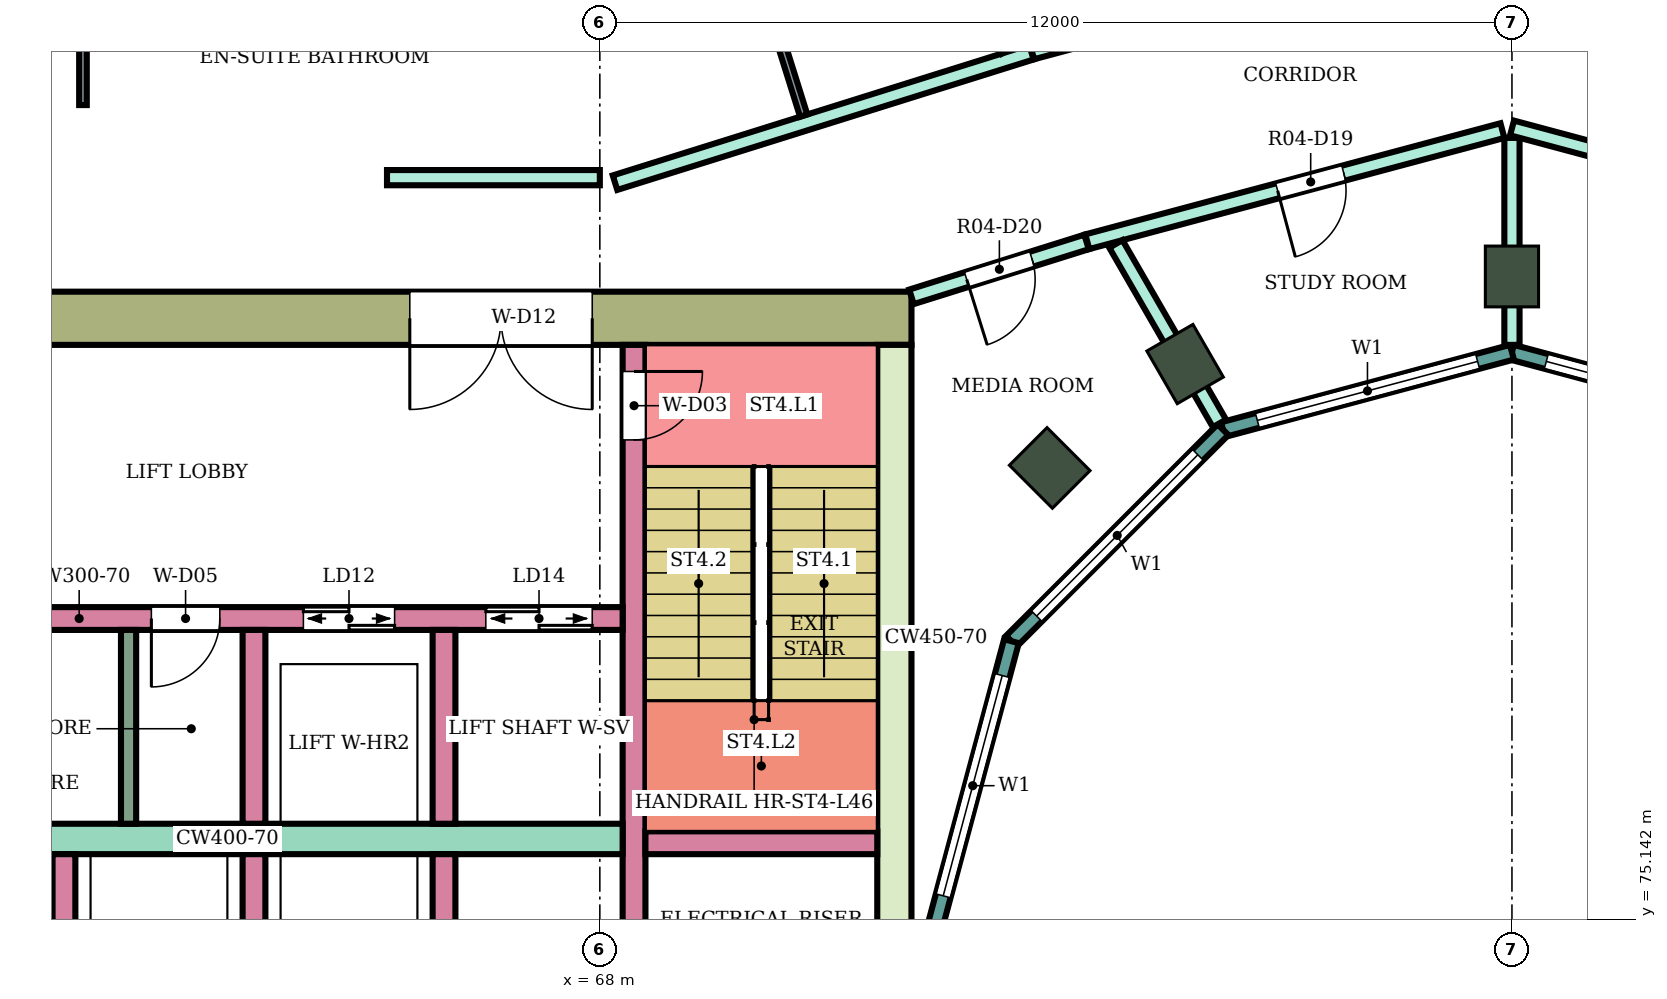
"""IFC4 building model, lengths in metres.
Left out: names, types, materials, properties, quantities, classifications, styles, units other than length and angle.
Written with IfcOpenShell. Run it as: python <this file> out.ifc"""

import sys

from ifc_helpers import new_model, si_unit, direction, frame, frame_2d, origin, origin_2d, place, context, subcontext, project, spatial, rectangle, extrude, element, fill, save


model = new_model("IFC4")
c1 = context("Model", 3, precision=1e-05, world=origin(), true_north=direction((0.0, 1.0)))
c2 = subcontext(c1, "Body", "Model", "MODEL_VIEW")
j1 = project(units=[si_unit("LENGTHUNIT", "METRE"), si_unit("PLANEANGLEUNIT", "RADIAN")], contexts=[c1])
p1 = place(None, origin())
s1 = spatial("IfcSite", under=j1, at=p1, CompositionType="ELEMENT")
p2 = place(p1, origin())
s2 = spatial("IfcBuilding", under=s1, at=p2, CompositionType="ELEMENT")
p3 = place(p2, frame((0.0, 0.0, 198.7)))
s3 = spatial("IfcBuildingStorey", under=s2, at=p3, CompositionType="ELEMENT", Elevation=198.7)
for number, where, z_axis, x_axis in (
    (1, (80.0, 83.6, 0.0), (0.0, 0.0, 1.0), (0.0, 1.0, 0.0)),
    (2, (75.7, 82.448, 0.0), (0.0, 0.0, 1.0), (-0.5, 0.866, 0.0)),
    (3, (73.919, 81.081, 0.0), (0.0, 0.0, 1.0), (-0.707, 0.707, 0.0)),
):
    element("IfcColumn", number, at=place(p3, frame(where, z_axis=z_axis, x_axis=x_axis)), inside=s3, PredefinedType="COLUMN", context=c2, shape_type="SweptSolid", body=[
        extrude(rectangle(XDim=0.8, YDim=0.7, at=origin_2d()), origin(), (0.0, 0.0, 1.0), 4.1),
    ])
p4 = place(p3, frame((72.1, 83.05, 0.0), z_axis=(0.0, 0.0, 1.0), x_axis=(-1.0, 0.0, 0.0)))
e4 = element("IfcWall", 4, at=p4, inside=s3, PredefinedType="SHEAR", context=c2, shape_type="SweptSolid", body=[
    extrude(rectangle(XDim=14.8, YDim=0.7, at=frame_2d((7.4, 0.0))), origin(), (0.0, 0.0, 1.0), 3.78),
])
p5 = place(p4, frame((4.2, 0.0, 0.0)))
e5 = element("IfcOpeningElement", 5, at=p5, cuts=e4, PredefinedType="OPENING", context=c2, shape_type="SweptSolid", body=[
    extrude(rectangle(XDim=2.4, YDim=2.4, at=frame_2d((1.2, 1.2))), frame((0.0, 0.36, 0.0), z_axis=(0.0, -1.0, 0.0), x_axis=(1.0, 0.0, 0.0)), (0.0, 0.0, 1.0), 0.72),
])
p6 = place(p3, frame((71.875, 82.7, 0.0), z_axis=(0.0, 0.0, 1.0), x_axis=(0.0, -1.0, 0.0)))
e6 = element("IfcWall", 6, at=p6, inside=s3, PredefinedType="SHEAR", context=c2, shape_type="SweptSolid", body=[
    extrude(rectangle(XDim=7.7, YDim=0.45, at=frame_2d((3.85, 0.0))), origin(), (0.0, 0.0, 1.0), 3.78),
])
p7 = place(p3, frame((68.45, 82.7, 0.0), z_axis=(0.0, 0.0, 1.0), x_axis=(0.0, -1.0, 0.0)))
e7 = element("IfcWall", 7, at=p7, inside=s3, PredefinedType="SHEAR", context=c2, shape_type="SweptSolid", body=[
    extrude(rectangle(XDim=7.7, YDim=0.3, at=frame_2d((3.85, 0.0))), origin(), (0.0, 0.0, 1.0), 3.78),
])
p8 = place(p7, frame((0.35, 0.0, 0.0)))
e8 = element("IfcOpeningElement", 8, at=p8, cuts=e7, PredefinedType="OPENING", context=c2, shape_type="SweptSolid", body=[
    extrude(rectangle(XDim=0.9, YDim=2.1, at=frame_2d((0.45, 1.05))), frame((0.0, 0.16, 0.0), z_axis=(0.0, -1.0, 0.0), x_axis=(1.0, 0.0, 0.0)), (0.0, 0.0, 1.0), 0.32),
])
p9 = place(p3, frame((71.65, 76.15, 0.0), z_axis=(0.0, 0.0, 1.0), x_axis=(-1.0, 0.0, 0.0)))
e9 = element("IfcWall", 9, at=p9, inside=s3, PredefinedType="SHEAR", context=c2, shape_type="SweptSolid", body=[
    extrude(rectangle(XDim=3.05, YDim=0.3, at=frame_2d((1.525, 0.0))), origin(), (0.0, 0.0, 1.0), 3.78),
])
p10 = place(p3, frame((68.3, 76.2, 0.0), z_axis=(0.0, 0.0, 1.0), x_axis=(-1.0, 0.0, 0.0)))
e10 = element("IfcWall", 10, at=p10, inside=s3, PredefinedType="SHEAR", context=c2, shape_type="SweptSolid", body=[
    extrude(rectangle(XDim=11.0, YDim=0.4, at=frame_2d((5.5, 0.0))), origin(), (0.0, 0.0, 1.0), 3.78),
])
p11 = place(p3, frame((68.3, 79.1, 0.0), z_axis=(0.0, 0.0, 1.0), x_axis=(-1.0, 0.0, 0.0)))
e11 = element("IfcWall", 11, at=p11, inside=s3, PredefinedType="SHEAR", context=c2, shape_type="SweptSolid", body=[
    extrude(rectangle(XDim=11.0, YDim=0.3, at=frame_2d((5.5, 0.0))), origin(), (0.0, 0.0, 1.0), 3.78),
])
p12 = place(p11, frame((0.4, 0.0, 0.0)))
e12 = element("IfcOpeningElement", 12, at=p12, cuts=e11, PredefinedType="OPENING", context=c2, shape_type="SweptSolid", body=[
    extrude(rectangle(XDim=1.4, YDim=2.1, at=frame_2d((0.7, 1.05))), frame((0.0, 0.16, 0.0), z_axis=(0.0, -1.0, 0.0), x_axis=(1.0, 0.0, 0.0)), (0.0, 0.0, 1.0), 0.32),
])
p13 = place(p11, frame((3.0, 0.0, 0.0)))
e13 = element("IfcOpeningElement", 13, at=p13, cuts=e11, PredefinedType="OPENING", context=c2, shape_type="SweptSolid", body=[
    extrude(rectangle(XDim=1.2, YDim=2.1, at=frame_2d((0.6, 1.05))), frame((0.0, 0.16, 0.0), z_axis=(0.0, -1.0, 0.0), x_axis=(1.0, 0.0, 0.0)), (0.0, 0.0, 1.0), 0.32),
])
p14 = place(p11, frame((5.3, 0.0, 0.0)))
e14 = element("IfcOpeningElement", 14, at=p14, cuts=e11, PredefinedType="OPENING", context=c2, shape_type="SweptSolid", body=[
    extrude(rectangle(XDim=0.9, YDim=2.1, at=frame_2d((0.45, 1.05))), frame((0.0, 0.16, 0.0), z_axis=(0.0, -1.0, 0.0), x_axis=(1.0, 0.0, 0.0)), (0.0, 0.0, 1.0), 0.32),
])
p15 = place(p11, frame((8.3, 0.0, 0.0)))
e15 = element("IfcOpeningElement", 15, at=p15, cuts=e11, PredefinedType="OPENING", context=c2, shape_type="SweptSolid", body=[
    extrude(rectangle(XDim=0.9, YDim=2.1, at=frame_2d((0.45, 1.05))), frame((0.0, 0.16, 0.0), z_axis=(0.0, -1.0, 0.0), x_axis=(1.0, 0.0, 0.0)), (0.0, 0.0, 1.0), 0.32),
])
for number, where, z_axis, x_axis in (
    (16, (65.95, 76.0, 0.0), (0.0, 0.0, 1.0), (0.0, -1.0, 0.0)),
    (17, (63.45, 76.0, 0.0), (0.0, 0.0, 1.0), (0.0, -1.0, 0.0)),
    (18, (60.95, 76.0, 0.0), (0.0, 0.0, 1.0), (0.0, -1.0, 0.0)),
    (19, (65.95, 78.95, 0.0), (0.0, 0.0, 1.0), (0.0, -1.0, 0.0)),
    (20, (63.45, 78.95, 0.0), (0.0, 0.0, 1.0), (0.0, -1.0, 0.0)),
):
    element("IfcWall", number, at=place(p3, frame(where, z_axis=z_axis, x_axis=x_axis)), inside=s3, PredefinedType="SHEAR", context=c2, shape_type="SweptSolid", body=[
        extrude(rectangle(XDim=2.55, YDim=0.3, at=frame_2d((1.275, 0.0))), origin(), (0.0, 0.0, 1.0), 3.78),
    ])
p16 = place(p3, frame((83.802, 81.585, 0.0), z_axis=(0.0, 0.0, 1.0), x_axis=(-0.965933654434, 0.258789828301, 0.0)))
e21 = element("IfcWall", 21, at=p16, inside=s3, PredefinedType="NOTDEFINED", context=c2, shape_type="SweptSolid", body=[
    extrude(rectangle(XDim=3.936, YDim=0.2, at=frame_2d((1.968, 0.0))), origin(), (0.0, 0.0, 1.0), 4.1),
])
p17 = place(p16, frame((0.468, 0.0, 0.9)))
e22 = element("IfcOpeningElement", 22, at=p17, cuts=e21, PredefinedType="OPENING", context=c2, shape_type="SweptSolid", body=[
    extrude(rectangle(XDim=3.0, YDim=2.3, at=frame_2d((1.5, 1.15))), frame((0.0, 0.11, 0.0), z_axis=(0.0, -1.0, 0.0), x_axis=(1.0, 0.0, 0.0)), (0.0, 0.0, 1.0), 0.22),
])
p18 = place(p3, frame((80.0, 82.604, 0.0), z_axis=(0.0, 0.0, 1.0), x_axis=(-0.965933654434, -0.258789828301, 0.0)))
e23 = element("IfcWall", 23, at=p18, inside=s3, PredefinedType="NOTDEFINED", context=c2, shape_type="SweptSolid", body=[
    extrude(rectangle(XDim=3.936, YDim=0.2, at=frame_2d((1.968, 0.0))), origin(), (0.0, 0.0, 1.0), 4.1),
])
p19 = place(p18, frame((0.468, 0.0, 0.9)))
e24 = element("IfcOpeningElement", 24, at=p19, cuts=e23, PredefinedType="OPENING", context=c2, shape_type="SweptSolid", body=[
    extrude(rectangle(XDim=3.0, YDim=2.3, at=frame_2d((1.5, 1.15))), frame((0.0, 0.11, 0.0), z_axis=(0.0, -1.0, 0.0), x_axis=(1.0, 0.0, 0.0)), (0.0, 0.0, 1.0), 0.22),
])
p20 = place(p3, frame((76.198, 81.585, 0.0), z_axis=(0.0, 0.0, 1.0), x_axis=(-0.707106781187, -0.707106781187, 0.0)))
e25 = element("IfcWall", 25, at=p20, inside=s3, PredefinedType="NOTDEFINED", context=c2, shape_type="SweptSolid", body=[
    extrude(rectangle(XDim=3.936, YDim=0.2, at=frame_2d((1.968, 0.0))), origin(), (0.0, 0.0, 1.0), 4.1),
])
p21 = place(p20, frame((0.468, 0.0, 0.9)))
e26 = element("IfcOpeningElement", 26, at=p21, cuts=e25, PredefinedType="OPENING", context=c2, shape_type="SweptSolid", body=[
    extrude(rectangle(XDim=3.0, YDim=2.3, at=frame_2d((1.5, 1.15))), frame((0.0, 0.11, 0.0), z_axis=(0.0, -1.0, 0.0), x_axis=(1.0, 0.0, 0.0)), (0.0, 0.0, 1.0), 0.22),
])
p22 = place(p3, frame((73.415, 78.802, 0.0), z_axis=(0.0, 0.0, 1.0), x_axis=(-0.258789828301, -0.965933654434, 0.0)))
e27 = element("IfcWall", 27, at=p22, inside=s3, PredefinedType="NOTDEFINED", context=c2, shape_type="SweptSolid", body=[
    extrude(rectangle(XDim=3.936, YDim=0.2, at=frame_2d((1.968, 0.0))), origin(), (0.0, 0.0, 1.0), 4.1),
])
p23 = place(p22, frame((0.468, 0.0, 0.9)))
e28 = element("IfcOpeningElement", 28, at=p23, cuts=e27, PredefinedType="OPENING", context=c2, shape_type="SweptSolid", body=[
    extrude(rectangle(XDim=3.0, YDim=2.3, at=frame_2d((1.5, 1.15))), frame((0.0, 0.11, 0.0), z_axis=(0.0, -1.0, 0.0), x_axis=(1.0, 0.0, 0.0)), (0.0, 0.0, 1.0), 0.22),
])
p24 = place(p3, frame((65.2, 84.9, 0.0), z_axis=(0.0, 0.0, 1.0), x_axis=(1.0, 0.0, 0.0)))
e29 = element("IfcWall", 29, at=p24, inside=s3, PredefinedType="PARTITIONING", context=c2, shape_type="SweptSolid", body=[
    extrude(rectangle(XDim=2.8, YDim=0.2, at=frame_2d((1.4, 0.0))), origin(), (0.0, 0.0, 1.0), 3.65),
])
p25 = place(p3, frame((68.2, 84.834, 0.0), z_axis=(0.0, 0.0, 1.0), x_axis=(0.954272398161, 0.298938438661, 0.0)))
e30 = element("IfcWall", 30, at=p25, inside=s3, PredefinedType="PARTITIONING", context=c2, shape_type="SweptSolid", body=[
    extrude(rectangle(XDim=5.74, YDim=0.2, at=frame_2d((2.87, 0.0))), origin(), (0.0, 0.0, 1.0), 3.65),
])
p26 = place(p3, frame((72.1, 83.332, 0.0), z_axis=(0.0, 0.0, 1.0), x_axis=(0.954233106619, 0.299063836383, 0.0)))
e31 = element("IfcWall", 31, at=p26, inside=s3, PredefinedType="PARTITIONING", context=c2, shape_type="SweptSolid", body=[
    extrude(rectangle(XDim=2.414, YDim=0.2, at=frame_2d((1.207, 0.0))), origin(), (0.0, 0.0, 1.0), 3.65),
])
p27 = place(p26, frame((0.762, 0.0, 0.0)))
e32 = element("IfcOpeningElement", 32, at=p27, cuts=e31, PredefinedType="OPENING", context=c2, shape_type="SweptSolid", body=[
    extrude(rectangle(XDim=0.9, YDim=2.1, at=frame_2d((0.45, 1.05))), frame((0.0, 0.11, 0.0), z_axis=(0.0, -1.0, 0.0), x_axis=(1.0, 0.0, 0.0)), (0.0, 0.0, 1.0), 0.22),
])
p28 = place(p3, frame((73.687, 86.554, 0.0), z_axis=(0.0, 0.0, 1.0), x_axis=(0.96595258731, 0.258719150952, 0.0)))
e33 = element("IfcWall", 33, at=p28, inside=s3, PredefinedType="PARTITIONING", context=c2, shape_type="SweptSolid", body=[
    extrude(rectangle(XDim=6.486, YDim=0.2, at=frame_2d((3.243, 0.0))), origin(), (0.0, 0.0, 1.0), 3.65),
])
p29 = place(p28, frame((0.55, 0.0, 0.0)))
e34 = element("IfcOpeningElement", 34, at=p29, cuts=e33, PredefinedType="OPENING", context=c2, shape_type="SweptSolid", body=[
    extrude(rectangle(XDim=1.0, YDim=2.1, at=frame_2d((0.5, 1.05))), frame((0.0, 0.11, 0.0), z_axis=(0.0, -1.0, 0.0), x_axis=(1.0, 0.0, 0.0)), (0.0, 0.0, 1.0), 0.22),
])
p30 = place(p3, frame((74.413, 84.057, 0.0), z_axis=(0.0, 0.0, 1.0), x_axis=(0.965972135939, 0.258646153246, 0.0)))
e35 = element("IfcWall", 35, at=p30, inside=s3, PredefinedType="PARTITIONING", context=c2, shape_type="SweptSolid", body=[
    extrude(rectangle(XDim=5.654, YDim=0.2, at=frame_2d((2.827, 0.0))), origin(), (0.0, 0.0, 1.0), 3.65),
])
p31 = place(p30, frame((2.593, 0.0, 0.0)))
e36 = element("IfcOpeningElement", 36, at=p31, cuts=e35, PredefinedType="OPENING", context=c2, shape_type="SweptSolid", body=[
    extrude(rectangle(XDim=0.9, YDim=2.1, at=frame_2d((0.45, 1.05))), frame((0.0, 0.11, 0.0), z_axis=(0.0, -1.0, 0.0), x_axis=(1.0, 0.0, 0.0)), (0.0, 0.0, 1.0), 0.22),
])
p32 = place(p3, frame((74.789, 84.028, 0.0), z_axis=(0.0, 0.0, 1.0), x_axis=(0.49993436518, -0.866063294749, 0.0)))
e37 = element("IfcWall", 37, at=p32, inside=s3, PredefinedType="PARTITIONING", context=c2, shape_type="SweptSolid", body=[
    extrude(rectangle(XDim=2.726, YDim=0.2, at=frame_2d((1.363, 0.0))), origin(), (0.0, 0.0, 1.0), 3.65),
])
p33 = place(p3, frame((80.0, 82.7, 0.0), z_axis=(0.0, 0.0, 1.0), x_axis=(0.0, 1.0, 0.0)))
e38 = element("IfcWall", 38, at=p33, inside=s3, PredefinedType="PARTITIONING", context=c2, shape_type="SweptSolid", body=[
    extrude(rectangle(XDim=2.723, YDim=0.2, at=frame_2d((1.362, 0.0))), origin(), (0.0, 0.0, 1.0), 3.65),
])
p34 = place(p3, frame((80.048, 88.233, 0.0), z_axis=(0.0, 0.0, 1.0), x_axis=(0.965787353661, -0.259335280109, 0.0)))
e39 = element("IfcWall", 39, at=p34, inside=s3, PredefinedType="PARTITIONING", context=c2, shape_type="SweptSolid", body=[
    extrude(rectangle(XDim=6.476, YDim=0.2, at=frame_2d((3.238, 0.0))), origin(), (0.0, 0.0, 1.0), 3.65),
])
p35 = place(p34, frame((4.936, 0.0, 0.0)))
e40 = element("IfcOpeningElement", 40, at=p35, cuts=e39, PredefinedType="OPENING", context=c2, shape_type="SweptSolid", body=[
    extrude(rectangle(XDim=1.0, YDim=2.1, at=frame_2d((0.5, 1.05))), frame((0.0, 0.11, 0.0), z_axis=(0.0, -1.0, 0.0), x_axis=(1.0, 0.0, 0.0)), (0.0, 0.0, 1.0), 0.22),
])
p36 = place(p3, frame((80.001, 85.554, 0.0), z_axis=(0.0, 0.0, 1.0), x_axis=(0.965917658836, -0.258849524528, 0.0)))
e41 = element("IfcWall", 41, at=p36, inside=s3, PredefinedType="PARTITIONING", context=c2, shape_type="SweptSolid", body=[
    extrude(rectangle(XDim=5.773, YDim=0.2, at=frame_2d((2.887, 0.0))), origin(), (0.0, 0.0, 1.0), 3.65),
])
p37 = place(p36, frame((1.991, 0.0, 0.0)))
e42 = element("IfcOpeningElement", 42, at=p37, cuts=e41, PredefinedType="OPENING", context=c2, shape_type="SweptSolid", body=[
    extrude(rectangle(XDim=1.8, YDim=2.1, at=frame_2d((0.9, 1.05))), frame((0.0, 0.11, 0.0), z_axis=(0.0, -1.0, 0.0), x_axis=(1.0, 0.0, 0.0)), (0.0, 0.0, 1.0), 0.22),
])
p38 = place(p3, frame((61.2, 85.855, 0.0), z_axis=(0.0, 0.0, 1.0), x_axis=(0.0, 1.0, 0.0)))
e43 = element("IfcWall", 43, at=p38, inside=s3, PredefinedType="PARTITIONING", context=c2, shape_type="SweptSolid", body=[
    extrude(rectangle(XDim=3.283, YDim=0.1, at=frame_2d((1.642, 0.0))), origin(), (0.0, 0.0, 1.0), 3.65),
])
p39 = place(p3, frame((67.101, 97.342, 0.0), z_axis=(0.0, 0.0, 1.0), x_axis=(0.499944152966, -0.866057644684, 0.0)))
e44 = element("IfcWall", 44, at=p39, inside=s3, PredefinedType="PARTITIONING", context=c2, shape_type="SweptSolid", body=[
    extrude(rectangle(XDim=12.456, YDim=0.1, at=frame_2d((6.228, 0.0))), origin(), (0.0, 0.0, 1.0), 3.65),
])
p40 = place(p39, frame((2.486, 0.0, 0.0)))
e45 = element("IfcOpeningElement", 45, at=p40, cuts=e44, PredefinedType="OPENING", context=c2, shape_type="SweptSolid", body=[
    extrude(rectangle(XDim=0.9, YDim=2.1, at=frame_2d((0.45, 1.05))), frame((0.0, 0.06, 0.0), z_axis=(0.0, -1.0, 0.0), x_axis=(1.0, 0.0, 0.0)), (0.0, 0.0, 1.0), 0.12),
])
p41 = place(p39, frame((9.85, 0.0, 0.0)))
e46 = element("IfcOpeningElement", 46, at=p41, cuts=e44, PredefinedType="OPENING", context=c2, shape_type="SweptSolid", body=[
    extrude(rectangle(XDim=0.8, YDim=2.1, at=frame_2d((0.4, 1.05))), frame((0.0, 0.06, 0.0), z_axis=(0.0, -1.0, 0.0), x_axis=(1.0, 0.0, 0.0)), (0.0, 0.0, 1.0), 0.12),
])
p42 = place(p3, frame((69.381, 89.867, 0.0), z_axis=(0.0, 0.0, 1.0), x_axis=(0.29908659099, -0.954225974856, 0.0)))
e47 = element("IfcWall", 47, at=p42, inside=s3, PredefinedType="PARTITIONING", context=c2, shape_type="SweptSolid", body=[
    extrude(rectangle(XDim=4.35, YDim=0.1, at=frame_2d((2.175, 0.0))), origin(), (0.0, 0.0, 1.0), 3.65),
])
p43 = place(p3, frame((61.8, 78.95, 0.0), z_axis=(0.0, 0.0, 1.0), x_axis=(0.0, -1.0, 0.0)))
e48 = element("IfcWall", 48, at=p43, inside=s3, PredefinedType="PARTITIONING", context=c2, shape_type="SweptSolid", body=[
    extrude(rectangle(XDim=2.55, YDim=0.2, at=frame_2d((1.275, 0.0))), origin(), (0.0, 0.0, 1.0), 3.78),
])
p44 = place(p17, origin())
e49 = element("IfcWindow", 49, at=p44, inside=s3, PartitioningType="SINGLE_PANEL", PredefinedType="WINDOW", context=c2, shape_type="SweptSolid", body=[
    extrude(rectangle(XDim=3.0, YDim=2.3, at=frame_2d((1.5, 1.15))), frame((0.0, 0.03, 0.0), z_axis=(0.0, -1.0, 0.0), x_axis=(1.0, 0.0, 0.0)), (0.0, 0.0, 1.0), 0.06),
])
fill(e22, e49)
p45 = place(p19, origin())
e50 = element("IfcWindow", 50, at=p45, inside=s3, PartitioningType="SINGLE_PANEL", PredefinedType="WINDOW", context=c2, shape_type="SweptSolid", body=[
    extrude(rectangle(XDim=3.0, YDim=2.3, at=frame_2d((1.5, 1.15))), frame((0.0, 0.03, 0.0), z_axis=(0.0, -1.0, 0.0), x_axis=(1.0, 0.0, 0.0)), (0.0, 0.0, 1.0), 0.06),
])
fill(e24, e50)
p46 = place(p21, origin())
e51 = element("IfcWindow", 51, at=p46, inside=s3, PartitioningType="SINGLE_PANEL", PredefinedType="WINDOW", context=c2, shape_type="SweptSolid", body=[
    extrude(rectangle(XDim=3.0, YDim=2.3, at=frame_2d((1.5, 1.15))), frame((0.0, 0.03, 0.0), z_axis=(0.0, -1.0, 0.0), x_axis=(1.0, 0.0, 0.0)), (0.0, 0.0, 1.0), 0.06),
])
fill(e26, e51)
p47 = place(p23, origin())
e52 = element("IfcWindow", 52, at=p47, inside=s3, PartitioningType="SINGLE_PANEL", PredefinedType="WINDOW", context=c2, shape_type="SweptSolid", body=[
    extrude(rectangle(XDim=3.0, YDim=2.3, at=frame_2d((1.5, 1.15))), frame((0.0, 0.03, 0.0), z_axis=(0.0, -1.0, 0.0), x_axis=(1.0, 0.0, 0.0)), (0.0, 0.0, 1.0), 0.06),
])
fill(e28, e52)
p48 = place(p31, frame((0.9, 0.0, 0.0), z_axis=(0.0, 0.0, 1.0), x_axis=(-1.0, 0.0, 0.0)))
e53 = element("IfcDoor", 53, at=p48, inside=s3, OperationType="SINGLE_SWING_RIGHT", PredefinedType="DOOR", context=c2, shape_type="SweptSolid", body=[
    extrude(rectangle(XDim=0.9, YDim=2.1, at=frame_2d((0.45, 1.05))), frame((0.0, 0.025, 0.0), z_axis=(0.0, -1.0, 0.0), x_axis=(1.0, 0.0, 0.0)), (0.0, 0.0, 1.0), 0.05),
])
fill(e36, e53)
p49 = place(p27, frame((0.9, 0.0, 0.0), z_axis=(0.0, 0.0, 1.0), x_axis=(-1.0, 0.0, 0.0)))
e54 = element("IfcDoor", 54, at=p49, inside=s3, OperationType="SINGLE_SWING_RIGHT", PredefinedType="DOOR", context=c2, shape_type="SweptSolid", body=[
    extrude(rectangle(XDim=0.9, YDim=2.1, at=frame_2d((0.45, 1.05))), frame((0.0, 0.025, 0.0), z_axis=(0.0, -1.0, 0.0), x_axis=(1.0, 0.0, 0.0)), (0.0, 0.0, 1.0), 0.05),
])
fill(e32, e54)
p50 = place(p8, origin())
e55 = element("IfcDoor", 55, at=p50, inside=s3, OperationType="SINGLE_SWING_LEFT", PredefinedType="DOOR", context=c2, shape_type="SweptSolid", body=[
    extrude(rectangle(XDim=0.9, YDim=2.1, at=frame_2d((0.45, 1.05))), frame((0.0, 0.025, 0.0), z_axis=(0.0, -1.0, 0.0), x_axis=(1.0, 0.0, 0.0)), (0.0, 0.0, 1.0), 0.05),
])
fill(e8, e55)
p51 = place(p12, origin())
e56 = element("IfcDoor", 56, at=p51, inside=s3, OperationType="DOUBLE_DOOR_SLIDING", PredefinedType="DOOR", context=c2, shape_type="SweptSolid", body=[
    extrude(rectangle(XDim=1.4, YDim=2.1, at=frame_2d((0.7, 1.05))), frame((0.0, 0.025, 0.0), z_axis=(0.0, -1.0, 0.0), x_axis=(1.0, 0.0, 0.0)), (0.0, 0.0, 1.0), 0.05),
])
fill(e12, e56)
p52 = place(p13, origin())
e57 = element("IfcDoor", 57, at=p52, inside=s3, OperationType="DOUBLE_DOOR_SLIDING", PredefinedType="DOOR", context=c2, shape_type="SweptSolid", body=[
    extrude(rectangle(XDim=1.2, YDim=2.1, at=frame_2d((0.6, 1.05))), frame((0.0, 0.025, 0.0), z_axis=(0.0, -1.0, 0.0), x_axis=(1.0, 0.0, 0.0)), (0.0, 0.0, 1.0), 0.05),
])
fill(e13, e57)
p53 = place(p14, origin())
e58 = element("IfcDoor", 58, at=p53, inside=s3, OperationType="SINGLE_SWING_RIGHT", PredefinedType="DOOR", context=c2, shape_type="SweptSolid", body=[
    extrude(rectangle(XDim=0.9, YDim=2.1, at=frame_2d((0.45, 1.05))), frame((0.0, 0.025, 0.0), z_axis=(0.0, -1.0, 0.0), x_axis=(1.0, 0.0, 0.0)), (0.0, 0.0, 1.0), 0.05),
])
fill(e14, e58)
p54 = place(p5, origin())
e59 = element("IfcDoor", 59, at=p54, inside=s3, OperationType="DOUBLE_DOOR_SINGLE_SWING", PredefinedType="DOOR", context=c2, shape_type="SweptSolid", body=[
    extrude(rectangle(XDim=2.4, YDim=2.4, at=frame_2d((1.2, 1.2))), frame((0.0, 0.025, 0.0), z_axis=(0.0, -1.0, 0.0), x_axis=(1.0, 0.0, 0.0)), (0.0, 0.0, 1.0), 0.05),
])
fill(e5, e59)
save(model, sys.argv[1])
